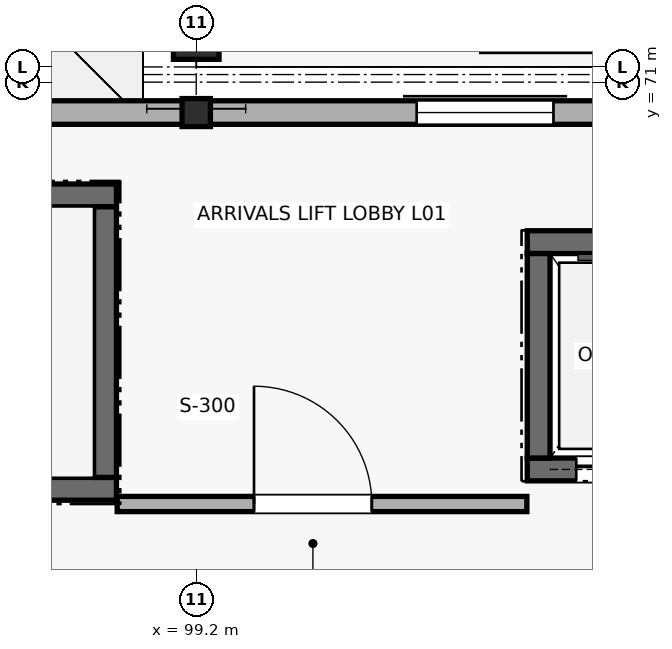
"""IFC4 building model, lengths in metres.
Left out: names, types, materials, properties, quantities, classifications, styles, units other than length and angle.
Written with IfcOpenShell. Run it as: python <this file> out.ifc"""

import sys

from ifc_helpers import new_model, si_unit, direction, frame, frame_2d, origin, origin_2d, place, context, subcontext, project, spatial, rectangle, i_section, extrude, element, fill, save


model = new_model("IFC4")
c1 = context("Model", 3, precision=1e-05, world=origin(), true_north=direction((0.0, 1.0)))
c2 = subcontext(c1, "Body", "Model", "MODEL_VIEW")
j1 = project(units=[si_unit("LENGTHUNIT", "METRE"), si_unit("PLANEANGLEUNIT", "RADIAN")], contexts=[c1])
p1 = place(None, origin())
s1 = spatial("IfcSite", under=j1, at=p1, CompositionType="ELEMENT")
p2 = place(p1, origin())
s2 = spatial("IfcBuilding", under=s1, at=p2, CompositionType="ELEMENT")
p3 = place(p2, frame((0.0, 0.0, 5.4)))
s3 = spatial("IfcBuildingStorey", under=s2, at=p3, CompositionType="ELEMENT", Elevation=5.4)
p4 = place(p3, frame((99.2, 70.6, 0.0), z_axis=(0.0, 0.0, 1.0), x_axis=(1.0, 0.0, 0.0)))
e1 = element("IfcColumn", 1, at=p4, inside=s3, PredefinedType="COLUMN", context=c2, shape_type="SweptSolid", body=[
    extrude(i_section(OverallWidth=0.373, OverallDepth=0.368, WebThickness=0.015, FlangeThickness=0.024, at=origin_2d()), origin(), (0.0, 0.0, 1.0), 4.5),
])
p5 = place(p3, frame((99.2, 71.6, 0.0), z_axis=(0.0, 0.0, 1.0), x_axis=(1.0, 0.0, 0.0)))
e2 = element("IfcColumn", 2, at=p5, inside=s3, PredefinedType="COLUMN", context=c2, shape_type="SweptSolid", body=[
    extrude(rectangle(XDim=0.6, YDim=0.6, at=origin_2d()), origin(), (0.0, 0.0, 1.0), 4.5),
])
p6 = place(p3, frame((99.195, 70.6, 0.0), z_axis=(0.0, 0.0, 1.0), x_axis=(-1.0, 0.0, 0.0)))
e3 = element("IfcWall", 3, at=p6, inside=s3, PredefinedType="SOLIDWALL", context=c2, shape_type="SweptSolid", body=[
    extrude(rectangle(XDim=10.589, YDim=0.31, at=frame_2d((5.294, 0.0))), origin(), (0.0, 0.0, 1.0), 3.592),
])
p7 = place(p6, frame((2.594, 0.0, 1.05)))
e4 = element("IfcOpeningElement", 4, at=p7, cuts=e3, PredefinedType="OPENING", context=c2, shape_type="SweptSolid", body=[
    extrude(rectangle(XDim=1.8, YDim=1.8, at=frame_2d((0.9, 0.9))), frame((0.0, 0.165, 0.0), z_axis=(0.0, -1.0, 0.0), x_axis=(1.0, 0.0, 0.0)), (0.0, 0.0, 1.0), 0.33),
])
p8 = place(p6, frame((6.294, 0.0, 1.05)))
e5 = element("IfcOpeningElement", 5, at=p8, cuts=e3, PredefinedType="OPENING", context=c2, shape_type="SweptSolid", body=[
    extrude(rectangle(XDim=1.8, YDim=1.8, at=frame_2d((0.9, 0.9))), frame((0.0, 0.165, 0.0), z_axis=(0.0, -1.0, 0.0), x_axis=(1.0, 0.0, 0.0)), (0.0, 0.0, 1.0), 0.33),
])
p9 = place(p3, frame((110.195, 70.6, 0.0), z_axis=(0.0, 0.0, 1.0), x_axis=(-1.0, 0.0, 0.0)))
e6 = element("IfcWall", 6, at=p9, inside=s3, PredefinedType="SOLIDWALL", context=c2, shape_type="SweptSolid", body=[
    extrude(rectangle(XDim=10.989, YDim=0.31, at=frame_2d((5.495, 0.0))), origin(), (0.0, 0.0, 1.0), 3.592),
])
p10 = place(p9, frame((2.594, 0.0, 1.05)))
e7 = element("IfcOpeningElement", 7, at=p10, cuts=e6, PredefinedType="OPENING", context=c2, shape_type="SweptSolid", body=[
    extrude(rectangle(XDim=1.8, YDim=1.8, at=frame_2d((0.9, 0.9))), frame((0.0, 0.165, 0.0), z_axis=(0.0, -1.0, 0.0), x_axis=(1.0, 0.0, 0.0)), (0.0, 0.0, 1.0), 0.33),
])
p11 = place(p9, frame((6.294, 0.0, 1.05)))
e8 = element("IfcOpeningElement", 8, at=p11, cuts=e6, PredefinedType="OPENING", context=c2, shape_type="SweptSolid", body=[
    extrude(rectangle(XDim=1.8, YDim=1.8, at=frame_2d((0.9, 0.9))), frame((0.0, 0.165, 0.0), z_axis=(0.0, -1.0, 0.0), x_axis=(1.0, 0.0, 0.0)), (0.0, 0.0, 1.0), 0.33),
])
p12 = place(p3, frame((89.5, 65.65, 0.0), z_axis=(0.0, 0.0, 1.0), x_axis=(1.0, 0.0, 0.0)))
e9 = element("IfcWall", 9, at=p12, inside=s3, PredefinedType="SHEAR", context=c2, shape_type="SweptSolid", body=[
    extrude(rectangle(XDim=8.65, YDim=0.3, at=frame_2d((4.325, 0.0))), origin(), (0.0, 0.0, 1.0), 4.28),
])
p13 = place(p12, frame((0.55, 0.0, 0.0)))
e10 = element("IfcOpeningElement", 10, at=p13, cuts=e9, PredefinedType="OPENING", context=c2, shape_type="SweptSolid", body=[
    extrude(rectangle(XDim=1.35, YDim=2.2, at=frame_2d((0.675, 1.1))), frame((0.0, 0.16, 0.0), z_axis=(0.0, -1.0, 0.0), x_axis=(1.0, 0.0, 0.0)), (0.0, 0.0, 1.0), 0.32),
])
p14 = place(p3, frame((98.15, 69.51, 0.0), z_axis=(0.0, 0.0, 1.0), x_axis=(-1.0, 0.0, 0.0)))
e11 = element("IfcWall", 11, at=p14, inside=s3, PredefinedType="SHEAR", context=c2, shape_type="SweptSolid", body=[
    extrude(rectangle(XDim=8.65, YDim=0.3, at=frame_2d((4.325, 0.0))), origin(), (0.0, 0.0, 1.0), 4.28),
])
p15 = place(p3, frame((98.0, 65.8, 0.0), z_axis=(0.0, 0.0, 1.0), x_axis=(0.0, 1.0, 0.0)))
e12 = element("IfcWall", 12, at=p15, inside=s3, PredefinedType="SHEAR", context=c2, shape_type="SweptSolid", body=[
    extrude(rectangle(XDim=3.56, YDim=0.3, at=frame_2d((1.78, 0.0))), origin(), (0.0, 0.0, 1.0), 4.28),
])
p16 = place(p3, frame((103.555, 65.905, 0.0), z_axis=(0.0, 0.0, 1.0), x_axis=(1.0, 0.0, 0.0)))
e13 = element("IfcWall", 13, at=p16, inside=s3, PredefinedType="SHEAR", context=c2, shape_type="SweptSolid", body=[
    extrude(rectangle(XDim=2.49, YDim=0.3, at=frame_2d((1.245, 0.0))), origin(), (0.0, 0.0, 1.0), 4.28),
])
p17 = place(p16, frame((0.645, 0.0, 0.0)))
e14 = element("IfcOpeningElement", 14, at=p17, cuts=e13, PredefinedType="OPENING", context=c2, shape_type="SweptSolid", body=[
    extrude(rectangle(XDim=1.2, YDim=2.15, at=frame_2d((0.6, 1.075))), frame((0.0, 0.16, 0.0), z_axis=(0.0, -1.0, 0.0), x_axis=(1.0, 0.0, 0.0)), (0.0, 0.0, 1.0), 0.32),
])
p18 = place(p3, frame((106.045, 68.895, 0.0), z_axis=(0.0, 0.0, 1.0), x_axis=(-1.0, 0.0, 0.0)))
e15 = element("IfcWall", 15, at=p18, inside=s3, PredefinedType="SHEAR", context=c2, shape_type="SweptSolid", body=[
    extrude(rectangle(XDim=2.49, YDim=0.3, at=frame_2d((1.245, 0.0))), origin(), (0.0, 0.0, 1.0), 4.28),
])
p19 = place(p3, frame((103.705, 68.745, 0.0), z_axis=(0.0, 0.0, 1.0), x_axis=(0.0, -1.0, 0.0)))
e16 = element("IfcWall", 16, at=p19, inside=s3, PredefinedType="SHEAR", context=c2, shape_type="SweptSolid", body=[
    extrude(rectangle(XDim=2.69, YDim=0.3, at=frame_2d((1.345, 0.0))), origin(), (0.0, 0.0, 1.0), 4.28),
])
p20 = place(p3, frame((98.16, 65.45, 0.0), z_axis=(0.0, 0.0, 1.0), x_axis=(1.0, 0.0, 0.0)))
e17 = element("IfcWall", 17, at=p20, inside=s3, PredefinedType="PARTITIONING", context=c2, shape_type="SweptSolid", body=[
    extrude(rectangle(XDim=5.39, YDim=0.2, at=frame_2d((2.695, 0.0))), origin(), (0.0, 0.0, 1.0), 3.739),
])
p21 = place(p20, frame((1.8, 0.0, 0.0)))
e18 = element("IfcOpeningElement", 18, at=p21, cuts=e17, PredefinedType="OPENING", context=c2, shape_type="SweptSolid", body=[
    extrude(rectangle(XDim=1.55, YDim=2.3, at=frame_2d((0.775, 1.15))), frame((0.0, 0.11, 0.0), z_axis=(0.0, -1.0, 0.0), x_axis=(1.0, 0.0, 0.0)), (0.0, 0.0, 1.0), 0.22),
])
p22 = place(p11, origin())
e19 = element("IfcWindow", 19, at=p22, inside=s3, PartitioningType="SINGLE_PANEL", PredefinedType="WINDOW", context=c2, shape_type="SweptSolid", body=[
    extrude(rectangle(XDim=1.8, YDim=1.8, at=frame_2d((0.9, 0.9))), frame((0.0, 0.03, 0.0), z_axis=(0.0, -1.0, 0.0), x_axis=(1.0, 0.0, 0.0)), (0.0, 0.0, 1.0), 0.06),
])
fill(e8, e19)
p23 = place(p17, frame((1.2, 0.0, 0.0), z_axis=(0.0, 0.0, 1.0), x_axis=(-1.0, 0.0, 0.0)))
e20 = element("IfcDoor", 20, at=p23, inside=s3, OperationType="DOUBLE_DOOR_SLIDING", PredefinedType="DOOR", context=c2, shape_type="SweptSolid", body=[
    extrude(rectangle(XDim=1.2, YDim=2.15, at=frame_2d((0.6, 1.075))), frame((0.0, 0.025, 0.0), z_axis=(0.0, -1.0, 0.0), x_axis=(1.0, 0.0, 0.0)), (0.0, 0.0, 1.0), 0.05),
])
fill(e14, e20)
p24 = place(p21, origin())
e21 = element("IfcDoor", 21, at=p24, inside=s3, OperationType="SINGLE_SWING_LEFT", PredefinedType="DOOR", context=c2, shape_type="SweptSolid", body=[
    extrude(rectangle(XDim=1.55, YDim=2.3, at=frame_2d((0.775, 1.15))), frame((0.0, 0.025, 0.0), z_axis=(0.0, -1.0, 0.0), x_axis=(1.0, 0.0, 0.0)), (0.0, 0.0, 1.0), 0.05),
])
fill(e18, e21)
save(model, sys.argv[1])
